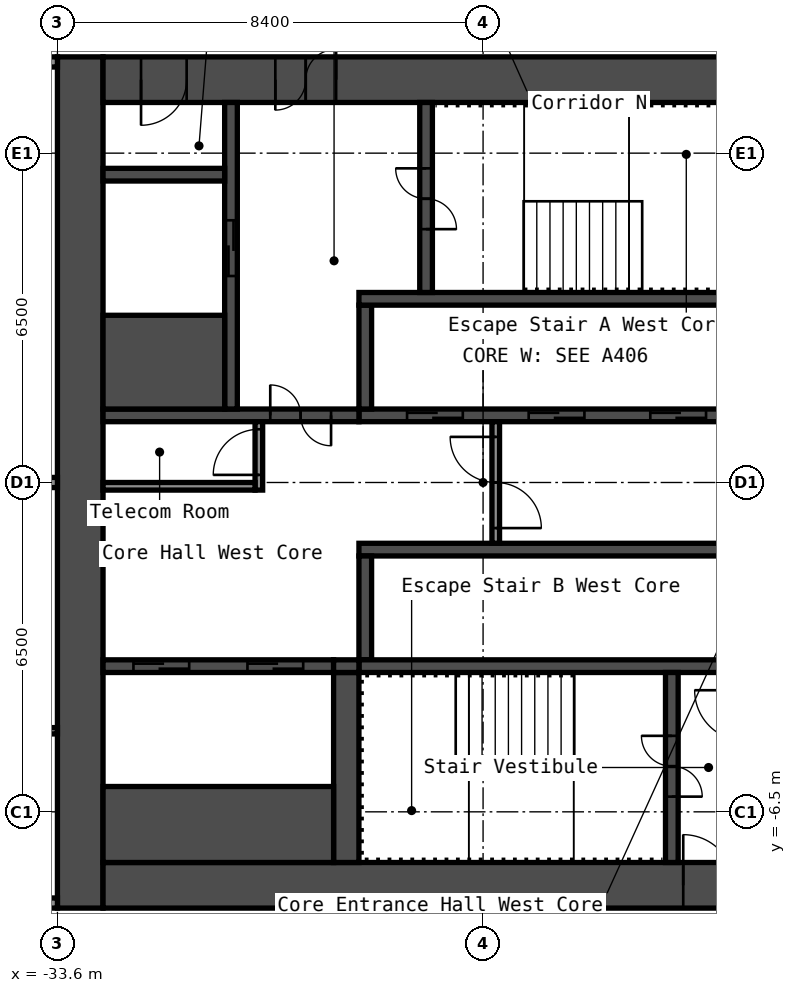
"""IFC4 building model, lengths in metres.
Left out: names, types, materials, properties, quantities, classifications, styles, units other than length and angle.
Written with IfcOpenShell. Run it as: python <this file> out.ifc"""

import sys

from ifc_helpers import new_model, si_unit, direction, frame, frame_2d, origin, place, context, subcontext, project, spatial, rectangle, extrude, element, fill, save


model = new_model("IFC4")
c1 = context("Model", 3, precision=1e-05, world=origin(), true_north=direction((0.0, 1.0)))
c2 = subcontext(c1, "Body", "Model", "MODEL_VIEW")
j1 = project(units=[si_unit("LENGTHUNIT", "METRE"), si_unit("PLANEANGLEUNIT", "RADIAN")], contexts=[c1])
p1 = place(None, origin())
s1 = spatial("IfcSite", under=j1, at=p1, CompositionType="ELEMENT")
p2 = place(p1, origin())
s2 = spatial("IfcBuilding", under=s1, at=p2, CompositionType="ELEMENT")
p3 = place(p2, frame((0.0, 0.0, 42.2)))
s3 = spatial("IfcBuildingStorey", under=s2, at=p3, CompositionType="ELEMENT", Elevation=42.2)
p4 = place(p3, frame((-33.15, -8.4, 0.0), z_axis=(0.0, 0.0, 1.0), x_axis=(0.0, 1.0, 0.0)))
e1 = element("IfcWall", 1, at=p4, inside=s3, PredefinedType="SHEAR", context=c2, shape_type="SweptSolid", body=[
    extrude(rectangle(XDim=16.8, YDim=0.9, at=frame_2d((8.4, 0.0))), origin(), (0.0, 0.0, 1.0), 2.8),
])
p5 = place(p3, frame((-32.7, 7.95, 0.0), z_axis=(0.0, 0.0, 1.0), x_axis=(1.0, 0.0, 0.0)))
e2 = element("IfcWall", 2, at=p5, inside=s3, PredefinedType="SHEAR", context=c2, shape_type="SweptSolid", body=[
    extrude(rectangle(XDim=15.0, YDim=0.9, at=frame_2d((7.5, 0.0))), origin(), (0.0, 0.0, 1.0), 2.8),
])
p6 = place(p5, frame((3.4, 0.0, 0.0)))
e3 = element("IfcOpeningElement", 3, at=p6, cuts=e2, PredefinedType="OPENING", context=c2, shape_type="SweptSolid", body=[
    extrude(rectangle(XDim=1.2, YDim=2.1, at=frame_2d((0.6, 1.05))), frame((0.0, 0.46, 0.0), z_axis=(0.0, -1.0, 0.0), x_axis=(1.0, 0.0, 0.0)), (0.0, 0.0, 1.0), 0.92),
])
p7 = place(p5, frame((0.75, 0.0, 0.0)))
e4 = element("IfcOpeningElement", 4, at=p7, cuts=e2, PredefinedType="OPENING", context=c2, shape_type="SweptSolid", body=[
    extrude(rectangle(XDim=0.9, YDim=2.1, at=frame_2d((0.45, 1.05))), frame((0.0, 0.46, 0.0), z_axis=(0.0, -1.0, 0.0), x_axis=(1.0, 0.0, 0.0)), (0.0, 0.0, 1.0), 0.92),
])
p8 = place(p3, frame((-32.7, -7.95, 0.0), z_axis=(0.0, 0.0, 1.0), x_axis=(1.0, 0.0, 0.0)))
e5 = element("IfcWall", 5, at=p8, inside=s3, PredefinedType="SHEAR", context=c2, shape_type="SweptSolid", body=[
    extrude(rectangle(XDim=15.0, YDim=0.9, at=frame_2d((7.5, 0.0))), origin(), (0.0, 0.0, 1.0), 2.8),
])
p9 = place(p8, frame((11.45, 0.0, 0.0)))
e6 = element("IfcOpeningElement", 6, at=p9, cuts=e5, PredefinedType="OPENING", context=c2, shape_type="SweptSolid", body=[
    extrude(rectangle(XDim=1.0, YDim=2.1, at=frame_2d((0.5, 1.05))), frame((0.0, 0.46, 0.0), z_axis=(0.0, -1.0, 0.0), x_axis=(1.0, 0.0, 0.0)), (0.0, 0.0, 1.0), 0.92),
])
p10 = place(p3, frame((-27.65, 1.325, 0.0), z_axis=(0.0, 0.0, 1.0), x_axis=(1.0, 0.0, 0.0)))
e7 = element("IfcWall", 7, at=p10, inside=s3, PredefinedType="SHEAR", context=c2, shape_type="SweptSolid", body=[
    extrude(rectangle(XDim=7.5, YDim=0.25, at=frame_2d((3.75, 0.0))), origin(), (0.0, 0.0, 1.0), 2.8),
])
p11 = place(p10, frame((5.75, 0.0, 0.0)))
e8 = element("IfcOpeningElement", 8, at=p11, cuts=e7, PredefinedType="OPENING", context=c2, shape_type="SweptSolid", body=[
    extrude(rectangle(XDim=1.1, YDim=2.1, at=frame_2d((0.55, 1.05))), frame((0.0, 0.135, 0.0), z_axis=(0.0, -1.0, 0.0), x_axis=(1.0, 0.0, 0.0)), (0.0, 0.0, 1.0), 0.27),
])
p12 = place(p10, frame((3.35, 0.0, 0.0)))
e9 = element("IfcOpeningElement", 9, at=p12, cuts=e7, PredefinedType="OPENING", context=c2, shape_type="SweptSolid", body=[
    extrude(rectangle(XDim=1.1, YDim=2.1, at=frame_2d((0.55, 1.05))), frame((0.0, 0.135, 0.0), z_axis=(0.0, -1.0, 0.0), x_axis=(1.0, 0.0, 0.0)), (0.0, 0.0, 1.0), 0.27),
])
p13 = place(p10, frame((0.95, 0.0, 0.0)))
e10 = element("IfcOpeningElement", 10, at=p13, cuts=e7, PredefinedType="OPENING", context=c2, shape_type="SweptSolid", body=[
    extrude(rectangle(XDim=1.1, YDim=2.1, at=frame_2d((0.55, 1.05))), frame((0.0, 0.135, 0.0), z_axis=(0.0, -1.0, 0.0), x_axis=(1.0, 0.0, 0.0)), (0.0, 0.0, 1.0), 0.27),
])
p14 = place(p3, frame((-27.525, 1.45, 0.0), z_axis=(0.0, 0.0, 1.0), x_axis=(0.0, 1.0, 0.0)))
e11 = element("IfcWall", 11, at=p14, inside=s3, PredefinedType="SHEAR", context=c2, shape_type="SweptSolid", body=[
    extrude(rectangle(XDim=2.05, YDim=0.25, at=frame_2d((1.025, 0.0))), origin(), (0.0, 0.0, 1.0), 2.8),
])
p15 = place(p3, frame((-27.65, 3.625, 0.0), z_axis=(0.0, 0.0, 1.0), x_axis=(1.0, 0.0, 0.0)))
e12 = element("IfcWall", 12, at=p15, inside=s3, PredefinedType="SHEAR", context=c2, shape_type="SweptSolid", body=[
    extrude(rectangle(XDim=7.5, YDim=0.25, at=frame_2d((3.75, 0.0))), origin(), (0.0, 0.0, 1.0), 2.8),
])
p16 = place(p3, frame((-26.325, 3.75, 0.0), z_axis=(0.0, 0.0, 1.0), x_axis=(0.0, 1.0, 0.0)))
e13 = element("IfcWall", 13, at=p16, inside=s3, PredefinedType="SHEAR", context=c2, shape_type="SweptSolid", body=[
    extrude(rectangle(XDim=3.75, YDim=0.25, at=frame_2d((1.875, 0.0))), origin(), (0.0, 0.0, 1.0), 2.8),
])
p17 = place(p16, frame((1.25, 0.0, 0.0)))
e14 = element("IfcOpeningElement", 14, at=p17, cuts=e13, PredefinedType="OPENING", context=c2, shape_type="SweptSolid", body=[
    extrude(rectangle(XDim=1.2, YDim=2.1, at=frame_2d((0.6, 1.05))), frame((0.0, 0.135, 0.0), z_axis=(0.0, -1.0, 0.0), x_axis=(1.0, 0.0, 0.0)), (0.0, 0.0, 1.0), 0.27),
])
p18 = place(p3, frame((-32.7, 1.325, 0.0), z_axis=(0.0, 0.0, 1.0), x_axis=(1.0, 0.0, 0.0)))
e15 = element("IfcWall", 15, at=p18, inside=s3, PredefinedType="SHEAR", context=c2, shape_type="SweptSolid", body=[
    extrude(rectangle(XDim=5.05, YDim=0.25, at=frame_2d((2.525, 0.0))), origin(), (0.0, 0.0, 1.0), 2.8),
])
p19 = place(p18, frame((3.3, 0.0, 0.0)))
e16 = element("IfcOpeningElement", 16, at=p19, cuts=e15, PredefinedType="OPENING", context=c2, shape_type="SweptSolid", body=[
    extrude(rectangle(XDim=1.2, YDim=2.1, at=frame_2d((0.6, 1.05))), frame((0.0, 0.135, 0.0), z_axis=(0.0, -1.0, 0.0), x_axis=(1.0, 0.0, 0.0)), (0.0, 0.0, 1.0), 0.27),
])
p20 = place(p3, frame((-30.175, 1.45, 0.0), z_axis=(0.0, 0.0, 1.0), x_axis=(0.0, 1.0, 0.0)))
e17 = element("IfcWall", 17, at=p20, inside=s3, PredefinedType="SHEAR", context=c2, shape_type="SweptSolid", body=[
    extrude(rectangle(XDim=6.05, YDim=0.25, at=frame_2d((3.025, 0.0))), origin(), (0.0, 0.0, 1.0), 2.8),
])
p21 = place(p20, frame((2.625, 0.0, 0.0)))
e18 = element("IfcOpeningElement", 18, at=p21, cuts=e17, PredefinedType="OPENING", context=c2, shape_type="SweptSolid", body=[
    extrude(rectangle(XDim=1.1, YDim=2.1, at=frame_2d((0.55, 1.05))), frame((0.0, 0.135, 0.0), z_axis=(0.0, -1.0, 0.0), x_axis=(1.0, 0.0, 0.0)), (0.0, 0.0, 1.0), 0.27),
])
p22 = place(p3, frame((-32.7, 2.375, 0.0), z_axis=(0.0, 0.0, 1.0), x_axis=(1.0, 0.0, 0.0)))
e19 = element("IfcWall", 19, at=p22, inside=s3, PredefinedType="SHEAR", context=c2, shape_type="SweptSolid", body=[
    extrude(rectangle(XDim=2.4, YDim=1.85, at=frame_2d((1.2, 0.0))), origin(), (0.0, 0.0, 1.0), 2.8),
])
p23 = place(p3, frame((-32.7, 6.075, 0.0), z_axis=(0.0, 0.0, 1.0), x_axis=(1.0, 0.0, 0.0)))
e20 = element("IfcWall", 20, at=p23, inside=s3, PredefinedType="SHEAR", context=c2, shape_type="SweptSolid", body=[
    extrude(rectangle(XDim=2.4, YDim=0.25, at=frame_2d((1.2, 0.0))), origin(), (0.0, 0.0, 1.0), 2.8),
])
p24 = place(p3, frame((-27.65, -1.325, 0.0), z_axis=(0.0, 0.0, 1.0), x_axis=(1.0, 0.0, 0.0)))
e21 = element("IfcWall", 21, at=p24, inside=s3, PredefinedType="SHEAR", context=c2, shape_type="SweptSolid", body=[
    extrude(rectangle(XDim=7.5, YDim=0.25, at=frame_2d((3.75, 0.0))), origin(), (0.0, 0.0, 1.0), 2.8),
])
p25 = place(p3, frame((-27.525, -3.5, 0.0), z_axis=(0.0, 0.0, 1.0), x_axis=(0.0, 1.0, 0.0)))
e22 = element("IfcWall", 22, at=p25, inside=s3, PredefinedType="SHEAR", context=c2, shape_type="SweptSolid", body=[
    extrude(rectangle(XDim=2.05, YDim=0.25, at=frame_2d((1.025, 0.0))), origin(), (0.0, 0.0, 1.0), 2.8),
])
p26 = place(p3, frame((-27.65, -3.625, 0.0), z_axis=(0.0, 0.0, 1.0), x_axis=(1.0, 0.0, 0.0)))
e23 = element("IfcWall", 23, at=p26, inside=s3, PredefinedType="SHEAR", context=c2, shape_type="SweptSolid", body=[
    extrude(rectangle(XDim=7.5, YDim=0.25, at=frame_2d((3.75, 0.0))), origin(), (0.0, 0.0, 1.0), 2.8),
])
p27 = place(p3, frame((-21.475, -7.5, 0.0), z_axis=(0.0, 0.0, 1.0), x_axis=(0.0, 1.0, 0.0)))
e24 = element("IfcWall", 24, at=p27, inside=s3, PredefinedType="SHEAR", context=c2, shape_type="SweptSolid", body=[
    extrude(rectangle(XDim=3.75, YDim=0.25, at=frame_2d((1.875, 0.0))), origin(), (0.0, 0.0, 1.0), 2.8),
])
p28 = place(p27, frame((1.3, 0.0, 0.0)))
e25 = element("IfcOpeningElement", 25, at=p28, cuts=e24, PredefinedType="OPENING", context=c2, shape_type="SweptSolid", body=[
    extrude(rectangle(XDim=1.2, YDim=2.1, at=frame_2d((0.6, 1.05))), frame((0.0, 0.135, 0.0), z_axis=(0.0, -1.0, 0.0), x_axis=(1.0, 0.0, 0.0)), (0.0, 0.0, 1.0), 0.27),
])
p29 = place(p3, frame((-27.9, -7.5, 0.0), z_axis=(0.0, 0.0, 1.0), x_axis=(0.0, 1.0, 0.0)))
e26 = element("IfcWall", 26, at=p29, inside=s3, PredefinedType="SHEAR", context=c2, shape_type="SweptSolid", body=[
    extrude(rectangle(XDim=3.75, YDim=0.5, at=frame_2d((1.875, 0.0))), origin(), (0.0, 0.0, 1.0), 2.8),
])
p30 = place(p3, frame((-32.7, -3.625, 0.0), z_axis=(0.0, 0.0, 1.0), x_axis=(1.0, 0.0, 0.0)))
e27 = element("IfcWall", 27, at=p30, inside=s3, PredefinedType="SHEAR", context=c2, shape_type="SweptSolid", body=[
    extrude(rectangle(XDim=4.55, YDim=0.25, at=frame_2d((2.275, 0.0))), origin(), (0.0, 0.0, 1.0), 2.8),
])
p31 = place(p30, frame((2.85, 0.0, 0.0)))
e28 = element("IfcOpeningElement", 28, at=p31, cuts=e27, PredefinedType="OPENING", context=c2, shape_type="SweptSolid", body=[
    extrude(rectangle(XDim=1.1, YDim=2.1, at=frame_2d((0.55, 1.05))), frame((0.0, 0.135, 0.0), z_axis=(0.0, -1.0, 0.0), x_axis=(1.0, 0.0, 0.0)), (0.0, 0.0, 1.0), 0.27),
])
p32 = place(p30, frame((0.6, 0.0, 0.0)))
e29 = element("IfcOpeningElement", 29, at=p32, cuts=e27, PredefinedType="OPENING", context=c2, shape_type="SweptSolid", body=[
    extrude(rectangle(XDim=1.1, YDim=2.1, at=frame_2d((0.55, 1.05))), frame((0.0, 0.135, 0.0), z_axis=(0.0, -1.0, 0.0), x_axis=(1.0, 0.0, 0.0)), (0.0, 0.0, 1.0), 0.27),
])
p33 = place(p3, frame((-32.7, -6.75, 0.0), z_axis=(0.0, 0.0, 1.0), x_axis=(1.0, 0.0, 0.0)))
e30 = element("IfcWall", 30, at=p33, inside=s3, PredefinedType="SHEAR", context=c2, shape_type="SweptSolid", body=[
    extrude(rectangle(XDim=4.55, YDim=1.5, at=frame_2d((2.275, 0.0))), origin(), (0.0, 0.0, 1.0), 2.8),
])
p34 = place(p3, frame((-28.15, -3.625, 0.0), z_axis=(0.0, 0.0, 1.0), x_axis=(1.0, 0.0, 0.0)))
e31 = element("IfcWall", 31, at=p34, inside=s3, PredefinedType="SHEAR", context=c2, shape_type="SweptSolid", body=[
    extrude(rectangle(XDim=0.5, YDim=0.25, at=frame_2d((0.25, 0.0))), origin(), (0.0, 0.0, 1.0), 2.8),
])
p35 = place(p3, frame((-24.95, -1.2, 0.0), z_axis=(0.0, 0.0, 1.0), x_axis=(0.0, 1.0, 0.0)))
e32 = element("IfcWall", 32, at=p35, inside=s3, PredefinedType="PARTITIONING", context=c2, shape_type="SweptSolid", body=[
    extrude(rectangle(XDim=2.4, YDim=0.15, at=frame_2d((1.2, 0.0))), origin(), (0.0, 0.0, 1.0), 2.8),
])
p36 = place(p35, frame((0.3, 0.0, 0.0)))
e33 = element("IfcOpeningElement", 33, at=p36, cuts=e32, PredefinedType="OPENING", context=c2, shape_type="SweptSolid", body=[
    extrude(rectangle(XDim=1.8, YDim=2.1, at=frame_2d((0.9, 1.05))), frame((0.0, 0.085, 0.0), z_axis=(0.0, -1.0, 0.0), x_axis=(1.0, 0.0, 0.0)), (0.0, 0.0, 1.0), 0.17),
])
p37 = place(p3, frame((-29.625, -0.15, 0.0), z_axis=(0.0, 0.0, 1.0), x_axis=(0.0, 1.0, 0.0)))
e34 = element("IfcWall", 34, at=p37, inside=s3, PredefinedType="PARTITIONING", context=c2, shape_type="SweptSolid", body=[
    extrude(rectangle(XDim=1.35, YDim=0.15, at=frame_2d((0.675, 0.0))), origin(), (0.0, 0.0, 1.0), 2.8),
])
p38 = place(p37, frame((0.3, 0.0, 0.0)))
e35 = element("IfcOpeningElement", 35, at=p38, cuts=e34, PredefinedType="OPENING", context=c2, shape_type="SweptSolid", body=[
    extrude(rectangle(XDim=0.9, YDim=2.1, at=frame_2d((0.45, 1.05))), frame((0.0, 0.085, 0.0), z_axis=(0.0, -1.0, 0.0), x_axis=(1.0, 0.0, 0.0)), (0.0, 0.0, 1.0), 0.17),
])
p39 = place(p3, frame((-32.7, -0.075, 0.0), z_axis=(0.0, 0.0, 1.0), x_axis=(1.0, 0.0, 0.0)))
e36 = element("IfcWall", 36, at=p39, inside=s3, PredefinedType="PARTITIONING", context=c2, shape_type="SweptSolid", body=[
    extrude(rectangle(XDim=3.0, YDim=0.15, at=frame_2d((1.5, 0.0))), origin(), (0.0, 0.0, 1.0), 2.8),
])
p40 = place(p3, frame((-48.6, -8.3, 0.0), z_axis=(0.0, 0.0, 1.0), x_axis=(1.0, 0.0, 0.0)))
e37 = element("IfcWall", 37, at=p40, inside=s3, PredefinedType="PARTITIONING", context=c2, shape_type="SweptSolid", body=[
    extrude(rectangle(XDim=15.0, YDim=0.2, at=frame_2d((7.5, 0.0))), origin(), (0.0, 0.0, 1.0), 2.8),
])
p41 = place(p40, frame((4.45, 0.0, 0.0)))
e38 = element("IfcOpeningElement", 38, at=p41, cuts=e37, PredefinedType="OPENING", context=c2, shape_type="SweptSolid", body=[
    extrude(rectangle(XDim=1.0, YDim=2.1, at=frame_2d((0.5, 1.05))), frame((0.0, 0.11, 0.0), z_axis=(0.0, -1.0, 0.0), x_axis=(1.0, 0.0, 0.0)), (0.0, 0.0, 1.0), 0.22),
])
p42 = place(p40, frame((8.6, 0.0, 0.0)))
e39 = element("IfcOpeningElement", 39, at=p42, cuts=e37, PredefinedType="OPENING", context=c2, shape_type="SweptSolid", body=[
    extrude(rectangle(XDim=1.0, YDim=2.1, at=frame_2d((0.5, 1.05))), frame((0.0, 0.11, 0.0), z_axis=(0.0, -1.0, 0.0), x_axis=(1.0, 0.0, 0.0)), (0.0, 0.0, 1.0), 0.22),
])
p43 = place(p3, frame((-36.938, -4.9, 0.0), z_axis=(0.0, 0.0, 1.0), x_axis=(1.0, 0.0, 0.0)))
e40 = element("IfcWall", 40, at=p43, inside=s3, PredefinedType="PARTITIONING", context=c2, shape_type="SweptSolid", body=[
    extrude(rectangle(XDim=3.337, YDim=0.125, at=frame_2d((1.669, 0.0))), origin(), (0.0, 0.0, 1.0), 2.8),
])
p44 = place(p43, frame((1.238, 0.0, 0.0)))
e41 = element("IfcOpeningElement", 41, at=p44, cuts=e40, PredefinedType="OPENING", context=c2, shape_type="SweptSolid", body=[
    extrude(rectangle(XDim=0.8, YDim=2.1, at=frame_2d((0.4, 1.05))), frame((0.0, 0.073, 0.0), z_axis=(0.0, -1.0, 0.0), x_axis=(1.0, 0.0, 0.0)), (0.0, 0.0, 1.0), 0.145),
])
p45 = place(p3, frame((-48.5, 0.0, 0.0), z_axis=(0.0, 0.0, 1.0), x_axis=(1.0, 0.0, 0.0)))
e42 = element("IfcWall", 42, at=p45, inside=s3, PredefinedType="PARTITIONING", context=c2, shape_type="SweptSolid", body=[
    extrude(rectangle(XDim=14.9, YDim=0.2, at=frame_2d((7.45, 0.0))), origin(), (0.0, 0.0, 1.0), 2.8),
])
p46 = place(p3, frame((-48.6, 8.3, 0.0), z_axis=(0.0, 0.0, 1.0), x_axis=(1.0, 0.0, 0.0)))
e43 = element("IfcWall", 43, at=p46, inside=s3, PredefinedType="PARTITIONING", context=c2, shape_type="SweptSolid", body=[
    extrude(rectangle(XDim=15.0, YDim=0.2, at=frame_2d((7.5, 0.0))), origin(), (0.0, 0.0, 1.0), 2.8),
])
p47 = place(p46, frame((4.45, 0.0, 0.0)))
e44 = element("IfcOpeningElement", 44, at=p47, cuts=e43, PredefinedType="OPENING", context=c2, shape_type="SweptSolid", body=[
    extrude(rectangle(XDim=1.0, YDim=2.1, at=frame_2d((0.5, 1.05))), frame((0.0, 0.11, 0.0), z_axis=(0.0, -1.0, 0.0), x_axis=(1.0, 0.0, 0.0)), (0.0, 0.0, 1.0), 0.22),
])
p48 = place(p46, frame((8.42, 0.0, 0.0)))
e45 = element("IfcOpeningElement", 45, at=p48, cuts=e43, PredefinedType="OPENING", context=c2, shape_type="SweptSolid", body=[
    extrude(rectangle(XDim=0.9, YDim=2.1, at=frame_2d((0.45, 1.05))), frame((0.0, 0.11, 0.0), z_axis=(0.0, -1.0, 0.0), x_axis=(1.0, 0.0, 0.0)), (0.0, 0.0, 1.0), 0.22),
])
p49 = place(p46, frame((12.62, 0.0, 0.0)))
e46 = element("IfcOpeningElement", 46, at=p49, cuts=e43, PredefinedType="OPENING", context=c2, shape_type="SweptSolid", body=[
    extrude(rectangle(XDim=0.9, YDim=2.1, at=frame_2d((0.45, 1.05))), frame((0.0, 0.11, 0.0), z_axis=(0.0, -1.0, 0.0), x_axis=(1.0, 0.0, 0.0)), (0.0, 0.0, 1.0), 0.22),
])
p50 = place(p6, origin())
e47 = element("IfcDoor", 47, at=p50, inside=s3, OperationType="DOUBLE_DOOR_SINGLE_SWING", PredefinedType="DOOR", context=c2, shape_type="SweptSolid", body=[
    extrude(rectangle(XDim=1.2, YDim=2.1, at=frame_2d((0.6, 1.05))), frame((0.0, 0.025, 0.0), z_axis=(0.0, -1.0, 0.0), x_axis=(1.0, 0.0, 0.0)), (0.0, 0.0, 1.0), 0.05),
])
fill(e3, e47)
p51 = place(p7, origin())
e48 = element("IfcDoor", 48, at=p51, inside=s3, OperationType="SINGLE_SWING_LEFT", PredefinedType="DOOR", context=c2, shape_type="SweptSolid", body=[
    extrude(rectangle(XDim=0.9, YDim=2.1, at=frame_2d((0.45, 1.05))), frame((0.0, 0.025, 0.0), z_axis=(0.0, -1.0, 0.0), x_axis=(1.0, 0.0, 0.0)), (0.0, 0.0, 1.0), 0.05),
])
fill(e4, e48)
p52 = place(p9, origin())
e49 = element("IfcDoor", 49, at=p52, inside=s3, OperationType="SINGLE_SWING_RIGHT", PredefinedType="DOOR", context=c2, shape_type="SweptSolid", body=[
    extrude(rectangle(XDim=1.0, YDim=2.1, at=frame_2d((0.5, 1.05))), frame((0.0, 0.025, 0.0), z_axis=(0.0, -1.0, 0.0), x_axis=(1.0, 0.0, 0.0)), (0.0, 0.0, 1.0), 0.05),
])
fill(e6, e49)
p53 = place(p17, origin())
e50 = element("IfcDoor", 50, at=p53, inside=s3, OperationType="DOUBLE_DOOR_SINGLE_SWING", PredefinedType="DOOR", context=c2, shape_type="SweptSolid", body=[
    extrude(rectangle(XDim=1.2, YDim=2.1, at=frame_2d((0.6, 1.05))), frame((0.0, 0.025, 0.0), z_axis=(0.0, -1.0, 0.0), x_axis=(1.0, 0.0, 0.0)), (0.0, 0.0, 1.0), 0.05),
])
fill(e14, e50)
p54 = place(p28, origin())
e51 = element("IfcDoor", 51, at=p54, inside=s3, OperationType="DOUBLE_DOOR_SINGLE_SWING", PredefinedType="DOOR", context=c2, shape_type="SweptSolid", body=[
    extrude(rectangle(XDim=1.2, YDim=2.1, at=frame_2d((0.6, 1.05))), frame((0.0, 0.025, 0.0), z_axis=(0.0, -1.0, 0.0), x_axis=(1.0, 0.0, 0.0)), (0.0, 0.0, 1.0), 0.05),
])
fill(e25, e51)
p55 = place(p19, origin())
e52 = element("IfcDoor", 52, at=p55, inside=s3, OperationType="DOUBLE_DOOR_SINGLE_SWING", PredefinedType="DOOR", context=c2, shape_type="SweptSolid", body=[
    extrude(rectangle(XDim=1.2, YDim=2.1, at=frame_2d((0.6, 1.05))), frame((0.0, 0.025, 0.0), z_axis=(0.0, -1.0, 0.0), x_axis=(1.0, 0.0, 0.0)), (0.0, 0.0, 1.0), 0.05),
])
fill(e16, e52)
p56 = place(p36, origin())
e53 = element("IfcDoor", 53, at=p56, inside=s3, OperationType="DOUBLE_DOOR_SINGLE_SWING", PredefinedType="DOOR", context=c2, shape_type="SweptSolid", body=[
    extrude(rectangle(XDim=1.8, YDim=2.1, at=frame_2d((0.9, 1.05))), frame((0.0, 0.025, 0.0), z_axis=(0.0, -1.0, 0.0), x_axis=(1.0, 0.0, 0.0)), (0.0, 0.0, 1.0), 0.05),
])
fill(e33, e53)
p57 = place(p38, origin())
e54 = element("IfcDoor", 54, at=p57, inside=s3, OperationType="SINGLE_SWING_RIGHT", PredefinedType="DOOR", context=c2, shape_type="SweptSolid", body=[
    extrude(rectangle(XDim=0.9, YDim=2.1, at=frame_2d((0.45, 1.05))), frame((0.0, 0.025, 0.0), z_axis=(0.0, -1.0, 0.0), x_axis=(1.0, 0.0, 0.0)), (0.0, 0.0, 1.0), 0.05),
])
fill(e35, e54)
p58 = place(p11, origin())
e55 = element("IfcDoor", 55, at=p58, inside=s3, OperationType="DOUBLE_DOOR_SLIDING", PredefinedType="DOOR", context=c2, shape_type="SweptSolid", body=[
    extrude(rectangle(XDim=1.1, YDim=2.1, at=frame_2d((0.55, 1.05))), frame((0.0, 0.025, 0.0), z_axis=(0.0, -1.0, 0.0), x_axis=(1.0, 0.0, 0.0)), (0.0, 0.0, 1.0), 0.05),
])
fill(e8, e55)
p59 = place(p12, origin())
e56 = element("IfcDoor", 56, at=p59, inside=s3, OperationType="DOUBLE_DOOR_SLIDING", PredefinedType="DOOR", context=c2, shape_type="SweptSolid", body=[
    extrude(rectangle(XDim=1.1, YDim=2.1, at=frame_2d((0.55, 1.05))), frame((0.0, 0.025, 0.0), z_axis=(0.0, -1.0, 0.0), x_axis=(1.0, 0.0, 0.0)), (0.0, 0.0, 1.0), 0.05),
])
fill(e9, e56)
p60 = place(p13, origin())
e57 = element("IfcDoor", 57, at=p60, inside=s3, OperationType="DOUBLE_DOOR_SLIDING", PredefinedType="DOOR", context=c2, shape_type="SweptSolid", body=[
    extrude(rectangle(XDim=1.1, YDim=2.1, at=frame_2d((0.55, 1.05))), frame((0.0, 0.025, 0.0), z_axis=(0.0, -1.0, 0.0), x_axis=(1.0, 0.0, 0.0)), (0.0, 0.0, 1.0), 0.05),
])
fill(e10, e57)
p61 = place(p21, origin())
e58 = element("IfcDoor", 58, at=p61, inside=s3, OperationType="DOUBLE_DOOR_SLIDING", PredefinedType="DOOR", context=c2, shape_type="SweptSolid", body=[
    extrude(rectangle(XDim=1.1, YDim=2.1, at=frame_2d((0.55, 1.05))), frame((0.0, 0.025, 0.0), z_axis=(0.0, -1.0, 0.0), x_axis=(1.0, 0.0, 0.0)), (0.0, 0.0, 1.0), 0.05),
])
fill(e18, e58)
p62 = place(p31, origin())
e59 = element("IfcDoor", 59, at=p62, inside=s3, OperationType="DOUBLE_DOOR_SLIDING", PredefinedType="DOOR", context=c2, shape_type="SweptSolid", body=[
    extrude(rectangle(XDim=1.1, YDim=2.1, at=frame_2d((0.55, 1.05))), frame((0.0, 0.025, 0.0), z_axis=(0.0, -1.0, 0.0), x_axis=(1.0, 0.0, 0.0)), (0.0, 0.0, 1.0), 0.05),
])
fill(e28, e59)
p63 = place(p32, origin())
e60 = element("IfcDoor", 60, at=p63, inside=s3, OperationType="DOUBLE_DOOR_SLIDING", PredefinedType="DOOR", context=c2, shape_type="SweptSolid", body=[
    extrude(rectangle(XDim=1.1, YDim=2.1, at=frame_2d((0.55, 1.05))), frame((0.0, 0.025, 0.0), z_axis=(0.0, -1.0, 0.0), x_axis=(1.0, 0.0, 0.0)), (0.0, 0.0, 1.0), 0.05),
])
fill(e29, e60)
save(model, sys.argv[1])
